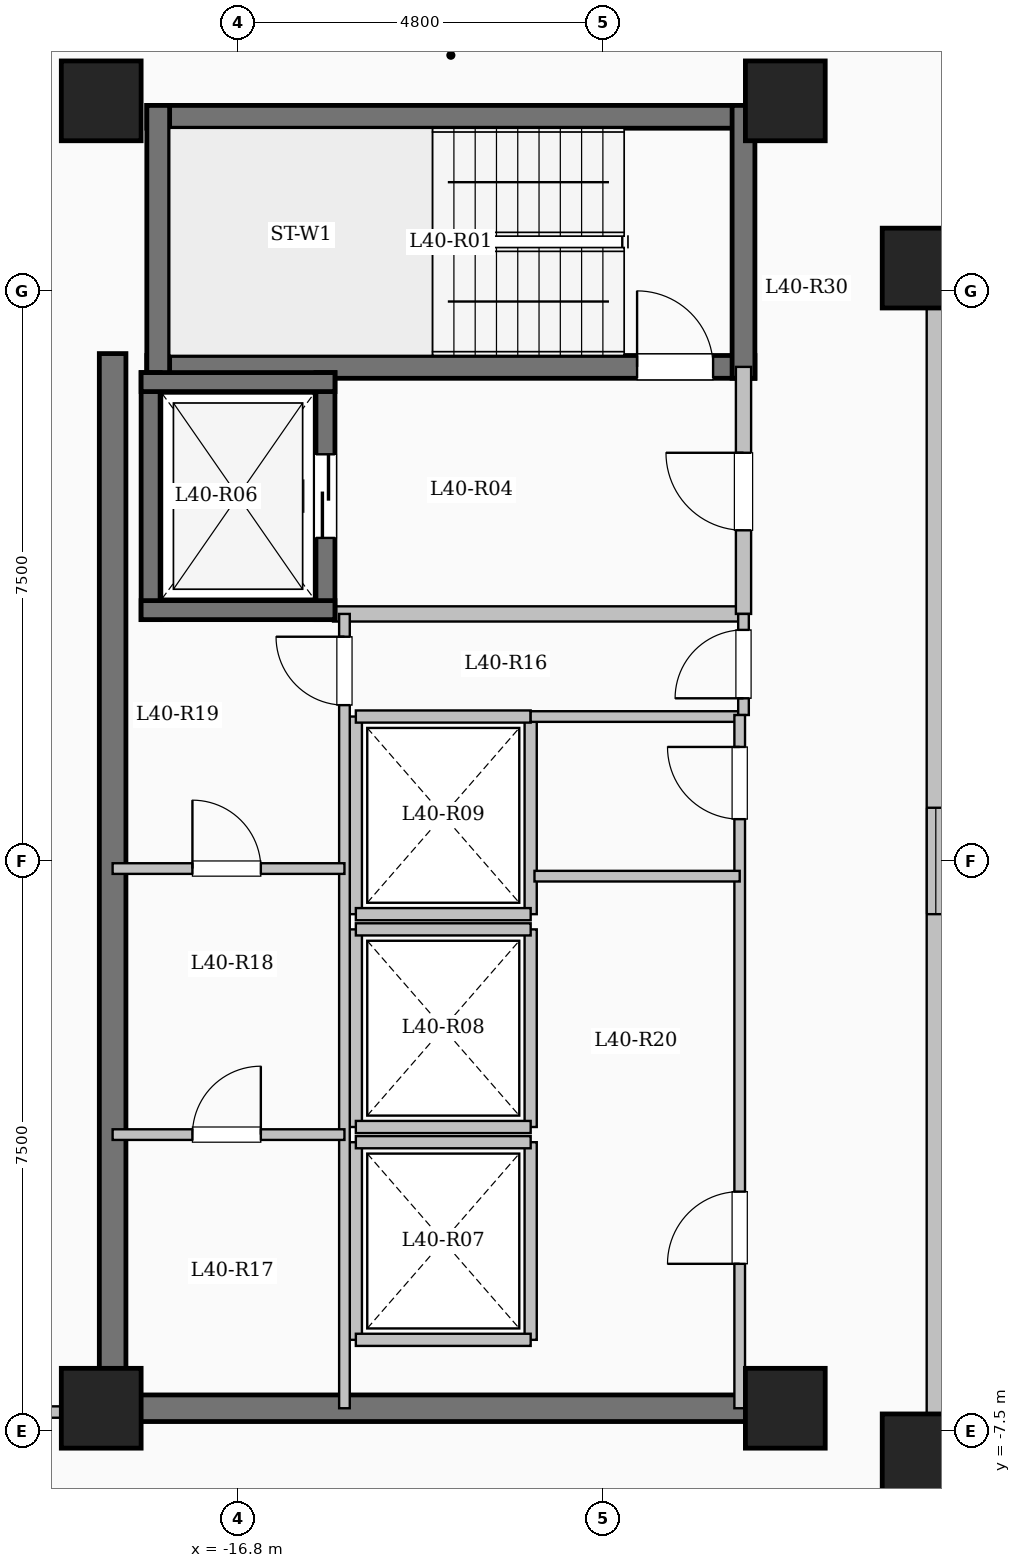
"""IFC4 building model, lengths in metres.
Left out: names, types, materials, properties, quantities, classifications, styles, units other than length and angle.
Written with IfcOpenShell. Run it as: python <this file> out.ifc"""

import sys

from ifc_helpers import new_model, si_unit, direction, frame, frame_2d, origin, origin_2d, place, context, subcontext, project, spatial, rectangle, extrude, element, fill, save


model = new_model("IFC4")
c1 = context("Model", 3, precision=1e-05, world=origin(), true_north=direction((0.0, 1.0)))
c2 = subcontext(c1, "Body", "Model", "MODEL_VIEW")
j1 = project(units=[si_unit("LENGTHUNIT", "METRE"), si_unit("PLANEANGLEUNIT", "RADIAN")], contexts=[c1])
p1 = place(None, origin())
s1 = spatial("IfcSite", under=j1, at=p1, CompositionType="ELEMENT")
p2 = place(p1, origin())
s2 = spatial("IfcBuilding", under=s1, at=p2, CompositionType="ELEMENT")
p3 = place(p2, frame((0.0, 0.0, 149.35)))
s3 = spatial("IfcBuildingStorey", under=s2, at=p3, CompositionType="ELEMENT", Elevation=149.35)
for number, where, z_axis, x_axis in (
    (1, (-7.8, -7.8, 0.0), (0.0, 0.0, 1.0), (1.0, 0.0, 0.0)),
    (2, (-7.8, 7.8, 0.0), (0.0, 0.0, 1.0), (1.0, 0.0, 0.0)),
    (3, (-9.6, -7.2, 0.0), (0.0, 0.0, 1.0), (1.0, 0.0, 0.0)),
    (4, (-9.6, 10.0, 0.0), (0.0, 0.0, 1.0), (1.0, 0.0, 0.0)),
    (5, (-18.6, -7.2, 0.0), (0.0, 0.0, 1.0), (1.0, 0.0, 0.0)),
    (6, (-18.6, 10.0, 0.0), (0.0, 0.0, 1.0), (1.0, 0.0, 0.0)),
):
    element("IfcColumn", number, at=place(p3, frame(where, z_axis=z_axis, x_axis=x_axis)), inside=s3, PredefinedType="COLUMN", context=c2, shape_type="SweptSolid", body=[
        extrude(rectangle(XDim=1.05, YDim=1.05, at=origin_2d()), origin(), (0.0, 0.0, 1.0), 3.35),
    ])
p4 = place(p3, frame((-7.62, -7.62, 0.0), z_axis=(0.0, 0.0, 1.0), x_axis=(1.0, 0.0, 0.0)))
e7 = element("IfcWall", 7, at=p4, inside=s3, PredefinedType="SOLIDWALL", context=c2, shape_type="SweptSolid", body=[
    extrude(rectangle(XDim=15.24, YDim=0.24, at=frame_2d((7.62, 0.0))), origin(), (0.0, 0.0, 1.0), 3.1),
])
p5 = place(p4, frame((6.92, 0.0, 0.95)))
e8 = element("IfcOpeningElement", 8, at=p5, cuts=e7, PredefinedType="OPENING", context=c2, shape_type="SweptSolid", body=[
    extrude(rectangle(XDim=1.4, YDim=1.5, at=frame_2d((0.7, 0.75))), frame((0.0, 0.13, 0.0), z_axis=(0.0, -1.0, 0.0), x_axis=(1.0, 0.0, 0.0)), (0.0, 0.0, 1.0), 0.26),
])
p6 = place(p3, frame((7.62, 7.62, 0.0), z_axis=(0.0, 0.0, 1.0), x_axis=(-1.0, 0.0, 0.0)))
e9 = element("IfcWall", 9, at=p6, inside=s3, PredefinedType="SOLIDWALL", context=c2, shape_type="SweptSolid", body=[
    extrude(rectangle(XDim=15.24, YDim=0.24, at=frame_2d((7.62, 0.0))), origin(), (0.0, 0.0, 1.0), 3.1),
])
p7 = place(p6, frame((6.92, 0.0, 0.95)))
e10 = element("IfcOpeningElement", 10, at=p7, cuts=e9, PredefinedType="OPENING", context=c2, shape_type="SweptSolid", body=[
    extrude(rectangle(XDim=1.4, YDim=1.5, at=frame_2d((0.7, 0.75))), frame((0.0, 0.13, 0.0), z_axis=(0.0, -1.0, 0.0), x_axis=(1.0, 0.0, 0.0)), (0.0, 0.0, 1.0), 0.26),
])
p8 = place(p3, frame((-7.62, 7.62, 0.0), z_axis=(0.0, 0.0, 1.0), x_axis=(0.0, -1.0, 0.0)))
e11 = element("IfcWall", 11, at=p8, inside=s3, PredefinedType="SOLIDWALL", context=c2, shape_type="SweptSolid", body=[
    extrude(rectangle(XDim=15.24, YDim=0.24, at=frame_2d((7.62, 0.0))), origin(), (0.0, 0.0, 1.0), 3.1),
])
p9 = place(p8, frame((6.92, 0.0, 0.95)))
e12 = element("IfcOpeningElement", 12, at=p9, cuts=e11, PredefinedType="OPENING", context=c2, shape_type="SweptSolid", body=[
    extrude(rectangle(XDim=1.4, YDim=1.5, at=frame_2d((0.7, 0.75))), frame((0.0, 0.13, 0.0), z_axis=(0.0, -1.0, 0.0), x_axis=(1.0, 0.0, 0.0)), (0.0, 0.0, 1.0), 0.26),
])
p10 = place(p3, frame((-18.0, 9.79, 0.0), z_axis=(0.0, 0.0, 1.0), x_axis=(1.0, 0.0, 0.0)))
e13 = element("IfcWall", 13, at=p10, inside=s3, PredefinedType="SHEAR", context=c2, shape_type="SweptSolid", body=[
    extrude(rectangle(XDim=8.0, YDim=0.3, at=frame_2d((4.0, 0.0))), origin(), (0.0, 0.0, 1.0), 3.35),
])
p11 = place(p3, frame((-18.0, 6.5, 0.0), z_axis=(0.0, 0.0, 1.0), x_axis=(1.0, 0.0, 0.0)))
e14 = element("IfcWall", 14, at=p11, inside=s3, PredefinedType="SHEAR", context=c2, shape_type="SweptSolid", body=[
    extrude(rectangle(XDim=8.0, YDim=0.3, at=frame_2d((4.0, 0.0))), origin(), (0.0, 0.0, 1.0), 3.35),
])
p12 = place(p11, frame((6.45, 0.0, 0.0)))
e15 = element("IfcOpeningElement", 15, at=p12, cuts=e14, PredefinedType="OPENING", context=c2, shape_type="SweptSolid", body=[
    extrude(rectangle(XDim=1.0, YDim=2.15, at=frame_2d((0.5, 1.075))), frame((0.0, 0.16, 0.0), z_axis=(0.0, -1.0, 0.0), x_axis=(1.0, 0.0, 0.0)), (0.0, 0.0, 1.0), 0.32),
])
for number, where, z_axis, x_axis in (
    (16, (-17.85, 6.35, 0.0), (0.0, 0.0, 1.0), (0.0, 1.0, 0.0)),
    (17, (-10.15, 6.35, 0.0), (0.0, 0.0, 1.0), (0.0, 1.0, 0.0)),
):
    element("IfcWall", number, at=place(p3, frame(where, z_axis=z_axis, x_axis=x_axis)), inside=s3, PredefinedType="SHEAR", context=c2, shape_type="SweptSolid", body=[
        extrude(rectangle(XDim=3.59, YDim=0.3, at=frame_2d((1.795, 0.0))), origin(), (0.0, 0.0, 1.0), 3.35),
    ])
p13 = place(p3, frame((-15.55, 3.25, 0.0), z_axis=(0.0, 0.0, 1.0), x_axis=(1.0, 0.0, 0.0)))
e18 = element("IfcWall", 18, at=p13, inside=s3, PredefinedType="SOLIDWALL", context=c2, shape_type="SweptSolid", body=[
    extrude(rectangle(XDim=5.4, YDim=0.2, at=frame_2d((2.7, 0.0))), origin(), (0.0, 0.0, 1.0), 3.1),
])
p14 = place(p3, frame((-10.15, 3.25, 0.0), z_axis=(0.0, 0.0, 1.0), x_axis=(0.0, 1.0, 0.0)))
e19 = element("IfcWall", 19, at=p14, inside=s3, PredefinedType="SOLIDWALL", context=c2, shape_type="SweptSolid", body=[
    extrude(rectangle(XDim=3.25, YDim=0.2, at=frame_2d((1.625, 0.0))), origin(), (0.0, 0.0, 1.0), 3.1),
])
p15 = place(p14, frame((1.1, 0.0, 0.0)))
e20 = element("IfcOpeningElement", 20, at=p15, cuts=e19, PredefinedType="OPENING", context=c2, shape_type="SweptSolid", body=[
    extrude(rectangle(XDim=1.02, YDim=2.15, at=frame_2d((0.51, 1.075))), frame((0.0, 0.11, 0.0), z_axis=(0.0, -1.0, 0.0), x_axis=(1.0, 0.0, 0.0)), (0.0, 0.0, 1.0), 0.22),
])
p16 = place(p3, frame((-17.95, 3.175, 0.0), z_axis=(0.0, 0.0, 1.0), x_axis=(0.0, 1.0, 0.0)))
e21 = element("IfcWall", 21, at=p16, inside=s3, PredefinedType="SHEAR", context=c2, shape_type="SweptSolid", body=[
    extrude(rectangle(XDim=3.25, YDim=0.25, at=frame_2d((1.625, 0.0))), origin(), (0.0, 0.0, 1.0), 3.35),
])
p17 = place(p3, frame((-15.65, 3.175, 0.0), z_axis=(0.0, 0.0, 1.0), x_axis=(0.0, 1.0, 0.0)))
e22 = element("IfcWall", 22, at=p17, inside=s3, PredefinedType="SHEAR", context=c2, shape_type="SweptSolid", body=[
    extrude(rectangle(XDim=3.25, YDim=0.25, at=frame_2d((1.625, 0.0))), origin(), (0.0, 0.0, 1.0), 3.35),
])
p18 = place(p17, frame((1.075, 0.0, 0.0)))
e23 = element("IfcOpeningElement", 23, at=p18, cuts=e22, PredefinedType="OPENING", context=c2, shape_type="SweptSolid", body=[
    extrude(rectangle(XDim=1.1, YDim=2.15, at=frame_2d((0.55, 1.075))), frame((0.0, 0.135, 0.0), z_axis=(0.0, -1.0, 0.0), x_axis=(1.0, 0.0, 0.0)), (0.0, 0.0, 1.0), 0.27),
])
for number, where, z_axis, x_axis in (
    (24, (-18.075, 3.3, 0.0), (0.0, 0.0, 1.0), (1.0, 0.0, 0.0)),
    (25, (-18.075, 6.3, 0.0), (0.0, 0.0, 1.0), (1.0, 0.0, 0.0)),
):
    element("IfcWall", number, at=place(p3, frame(where, z_axis=z_axis, x_axis=x_axis)), inside=s3, PredefinedType="SHEAR", context=c2, shape_type="SweptSolid", body=[
        extrude(rectangle(XDim=2.55, YDim=0.25, at=frame_2d((1.275, 0.0))), origin(), (0.0, 0.0, 1.0), 3.35),
    ])
for number, where, z_axis, x_axis in (
    (26, (-15.25, -6.3, 0.0), (0.0, 0.0, 1.0), (0.0, 1.0, 0.0)),
    (27, (-12.95, -6.3, 0.0), (0.0, 0.0, 1.0), (0.0, 1.0, 0.0)),
):
    element("IfcWall", number, at=place(p3, frame(where, z_axis=z_axis, x_axis=x_axis)), inside=s3, PredefinedType="SOLIDWALL", context=c2, shape_type="SweptSolid", body=[
        extrude(rectangle(XDim=2.6, YDim=0.16, at=frame_2d((1.3, 0.0))), origin(), (0.0, 0.0, 1.0), 3.1),
    ])
for number, where, z_axis, x_axis in (
    (28, (-15.25, -6.3, 0.0), (0.0, 0.0, 1.0), (1.0, 0.0, 0.0)),
    (29, (-15.25, -3.7, 0.0), (0.0, 0.0, 1.0), (1.0, 0.0, 0.0)),
):
    element("IfcWall", number, at=place(p3, frame(where, z_axis=z_axis, x_axis=x_axis)), inside=s3, PredefinedType="SOLIDWALL", context=c2, shape_type="SweptSolid", body=[
        extrude(rectangle(XDim=2.3, YDim=0.16, at=frame_2d((1.15, 0.0))), origin(), (0.0, 0.0, 1.0), 3.1),
    ])
for number, where, z_axis, x_axis in (
    (30, (-15.25, -3.5, 0.0), (0.0, 0.0, 1.0), (0.0, 1.0, 0.0)),
    (31, (-12.95, -3.5, 0.0), (0.0, 0.0, 1.0), (0.0, 1.0, 0.0)),
):
    element("IfcWall", number, at=place(p3, frame(where, z_axis=z_axis, x_axis=x_axis)), inside=s3, PredefinedType="SOLIDWALL", context=c2, shape_type="SweptSolid", body=[
        extrude(rectangle(XDim=2.6, YDim=0.16, at=frame_2d((1.3, 0.0))), origin(), (0.0, 0.0, 1.0), 3.1),
    ])
for number, where, z_axis, x_axis in (
    (32, (-15.25, -3.5, 0.0), (0.0, 0.0, 1.0), (1.0, 0.0, 0.0)),
    (33, (-15.25, -0.9, 0.0), (0.0, 0.0, 1.0), (1.0, 0.0, 0.0)),
):
    element("IfcWall", number, at=place(p3, frame(where, z_axis=z_axis, x_axis=x_axis)), inside=s3, PredefinedType="SOLIDWALL", context=c2, shape_type="SweptSolid", body=[
        extrude(rectangle(XDim=2.3, YDim=0.16, at=frame_2d((1.15, 0.0))), origin(), (0.0, 0.0, 1.0), 3.1),
    ])
for number, where, z_axis, x_axis in (
    (34, (-15.25, -0.7, 0.0), (0.0, 0.0, 1.0), (0.0, 1.0, 0.0)),
    (35, (-12.95, -0.7, 0.0), (0.0, 0.0, 1.0), (0.0, 1.0, 0.0)),
):
    element("IfcWall", number, at=place(p3, frame(where, z_axis=z_axis, x_axis=x_axis)), inside=s3, PredefinedType="SOLIDWALL", context=c2, shape_type="SweptSolid", body=[
        extrude(rectangle(XDim=2.6, YDim=0.16, at=frame_2d((1.3, 0.0))), origin(), (0.0, 0.0, 1.0), 3.1),
    ])
for number, where, z_axis, x_axis in (
    (36, (-15.25, -0.7, 0.0), (0.0, 0.0, 1.0), (1.0, 0.0, 0.0)),
    (37, (-15.25, 1.9, 0.0), (0.0, 0.0, 1.0), (1.0, 0.0, 0.0)),
):
    element("IfcWall", number, at=place(p3, frame(where, z_axis=z_axis, x_axis=x_axis)), inside=s3, PredefinedType="SOLIDWALL", context=c2, shape_type="SweptSolid", body=[
        extrude(rectangle(XDim=2.3, YDim=0.16, at=frame_2d((1.15, 0.0))), origin(), (0.0, 0.0, 1.0), 3.1),
    ])
p19 = place(p3, frame((-18.45, -7.375, 0.0), z_axis=(0.0, 0.0, 1.0), x_axis=(0.0, 1.0, 0.0)))
e38 = element("IfcWall", 38, at=p19, inside=s3, PredefinedType="SHEAR", context=c2, shape_type="SweptSolid", body=[
    extrude(rectangle(XDim=14.05, YDim=0.35, at=frame_2d((7.025, 0.0))), origin(), (0.0, 0.0, 1.0), 3.35),
])
p20 = place(p3, frame((-18.625, -7.2, 0.0), z_axis=(0.0, 0.0, 1.0), x_axis=(1.0, 0.0, 0.0)))
e39 = element("IfcWall", 39, at=p20, inside=s3, PredefinedType="SHEAR", context=c2, shape_type="SweptSolid", body=[
    extrude(rectangle(XDim=8.55, YDim=0.35, at=frame_2d((4.275, 0.0))), origin(), (0.0, 0.0, 1.0), 3.35),
])
p21 = place(p3, frame((-12.95, 1.9, 0.0), z_axis=(0.0, 0.0, 1.0), x_axis=(1.0, 0.0, 0.0)))
e40 = element("IfcWall", 40, at=p21, inside=s3, PredefinedType="PARTITIONING", context=c2, shape_type="SweptSolid", body=[
    extrude(rectangle(XDim=2.8, YDim=0.14, at=frame_2d((1.4, 0.0))), origin(), (0.0, 0.0, 1.0), 3.1),
])
p22 = place(p3, frame((-10.15, 1.92, 0.0), z_axis=(0.0, 0.0, 1.0), x_axis=(0.0, 1.0, 0.0)))
e41 = element("IfcWall", 41, at=p22, inside=s3, PredefinedType="PARTITIONING", context=c2, shape_type="SweptSolid", body=[
    extrude(rectangle(XDim=1.33, YDim=0.14, at=frame_2d((0.665, 0.0))), origin(), (0.0, 0.0, 1.0), 3.1),
])
p23 = place(p22, frame((0.22, 0.0, 0.0)))
e42 = element("IfcOpeningElement", 42, at=p23, cuts=e41, PredefinedType="OPENING", context=c2, shape_type="SweptSolid", body=[
    extrude(rectangle(XDim=0.9, YDim=2.08, at=frame_2d((0.45, 1.04))), frame((0.0, 0.08, 0.0), z_axis=(0.0, -1.0, 0.0), x_axis=(1.0, 0.0, 0.0)), (0.0, 0.0, 1.0), 0.16),
])
p24 = place(p3, frame((-15.4, -7.2, 0.0), z_axis=(0.0, 0.0, 1.0), x_axis=(0.0, 1.0, 0.0)))
e43 = element("IfcWall", 43, at=p24, inside=s3, PredefinedType="PARTITIONING", context=c2, shape_type="SweptSolid", body=[
    extrude(rectangle(XDim=10.45, YDim=0.14, at=frame_2d((5.225, 0.0))), origin(), (0.0, 0.0, 1.0), 3.1),
])
p25 = place(p24, frame((9.25, 0.0, 0.0)))
e44 = element("IfcOpeningElement", 44, at=p25, cuts=e43, PredefinedType="OPENING", context=c2, shape_type="SweptSolid", body=[
    extrude(rectangle(XDim=0.9, YDim=2.08, at=frame_2d((0.45, 1.04))), frame((0.0, 0.08, 0.0), z_axis=(0.0, -1.0, 0.0), x_axis=(1.0, 0.0, 0.0)), (0.0, 0.0, 1.0), 0.16),
])
p26 = place(p3, frame((-18.45, -3.6, 0.0), z_axis=(0.0, 0.0, 1.0), x_axis=(1.0, 0.0, 0.0)))
e45 = element("IfcWall", 45, at=p26, inside=s3, PredefinedType="PARTITIONING", context=c2, shape_type="SweptSolid", body=[
    extrude(rectangle(XDim=3.05, YDim=0.14, at=frame_2d((1.525, 0.0))), origin(), (0.0, 0.0, 1.0), 3.1),
])
p27 = place(p26, frame((1.05, 0.0, 0.0)))
e46 = element("IfcOpeningElement", 46, at=p27, cuts=e45, PredefinedType="OPENING", context=c2, shape_type="SweptSolid", body=[
    extrude(rectangle(XDim=0.9, YDim=2.08, at=frame_2d((0.45, 1.04))), frame((0.0, 0.08, 0.0), z_axis=(0.0, -1.0, 0.0), x_axis=(1.0, 0.0, 0.0)), (0.0, 0.0, 1.0), 0.16),
])
p28 = place(p3, frame((-18.45, -0.1, 0.0), z_axis=(0.0, 0.0, 1.0), x_axis=(1.0, 0.0, 0.0)))
e47 = element("IfcWall", 47, at=p28, inside=s3, PredefinedType="PARTITIONING", context=c2, shape_type="SweptSolid", body=[
    extrude(rectangle(XDim=3.05, YDim=0.14, at=frame_2d((1.525, 0.0))), origin(), (0.0, 0.0, 1.0), 3.1),
])
p29 = place(p28, frame((1.05, 0.0, 0.0)))
e48 = element("IfcOpeningElement", 48, at=p29, cuts=e47, PredefinedType="OPENING", context=c2, shape_type="SweptSolid", body=[
    extrude(rectangle(XDim=0.9, YDim=2.08, at=frame_2d((0.45, 1.04))), frame((0.0, 0.08, 0.0), z_axis=(0.0, -1.0, 0.0), x_axis=(1.0, 0.0, 0.0)), (0.0, 0.0, 1.0), 0.16),
])
p30 = place(p3, frame((-10.2, -7.2, 0.0), z_axis=(0.0, 0.0, 1.0), x_axis=(0.0, 1.0, 0.0)))
e49 = element("IfcWall", 49, at=p30, inside=s3, PredefinedType="PARTITIONING", context=c2, shape_type="SweptSolid", body=[
    extrude(rectangle(XDim=9.12, YDim=0.14, at=frame_2d((4.56, 0.0))), origin(), (0.0, 0.0, 1.0), 3.1),
])
p31 = place(p30, frame((1.9, 0.0, 0.0)))
e50 = element("IfcOpeningElement", 50, at=p31, cuts=e49, PredefinedType="OPENING", context=c2, shape_type="SweptSolid", body=[
    extrude(rectangle(XDim=0.95, YDim=2.12, at=frame_2d((0.475, 1.06))), frame((0.0, 0.08, 0.0), z_axis=(0.0, -1.0, 0.0), x_axis=(1.0, 0.0, 0.0)), (0.0, 0.0, 1.0), 0.16),
])
p32 = place(p30, frame((7.75, 0.0, 0.0)))
e51 = element("IfcOpeningElement", 51, at=p32, cuts=e49, PredefinedType="OPENING", context=c2, shape_type="SweptSolid", body=[
    extrude(rectangle(XDim=0.95, YDim=2.12, at=frame_2d((0.475, 1.06))), frame((0.0, 0.08, 0.0), z_axis=(0.0, -1.0, 0.0), x_axis=(1.0, 0.0, 0.0)), (0.0, 0.0, 1.0), 0.16),
])
p33 = place(p3, frame((-12.9, -0.2, 0.0), z_axis=(0.0, 0.0, 1.0), x_axis=(1.0, 0.0, 0.0)))
e52 = element("IfcWall", 52, at=p33, inside=s3, PredefinedType="PARTITIONING", context=c2, shape_type="SweptSolid", body=[
    extrude(rectangle(XDim=2.7, YDim=0.14, at=frame_2d((1.35, 0.0))), origin(), (0.0, 0.0, 1.0), 3.1),
])
p34 = place(p3, frame((-25.08, -7.25, 0.0), z_axis=(0.0, 0.0, 1.0), x_axis=(1.0, 0.0, 0.0)))
e53 = element("IfcWall", 53, at=p34, inside=s3, PredefinedType="PARTITIONING", context=c2, shape_type="SweptSolid", body=[
    extrude(rectangle(XDim=6.63, YDim=0.15, at=frame_2d((3.315, 0.0))), origin(), (0.0, 0.0, 1.0), 3.1),
])
p35 = place(p34, frame((3.58, 0.0, 0.0)))
e54 = element("IfcOpeningElement", 54, at=p35, cuts=e53, PredefinedType="OPENING", context=c2, shape_type="SweptSolid", body=[
    extrude(rectangle(XDim=1.08, YDim=2.15, at=frame_2d((0.54, 1.075))), frame((0.0, 0.085, 0.0), z_axis=(0.0, -1.0, 0.0), x_axis=(1.0, 0.0, 0.0)), (0.0, 0.0, 1.0), 0.17),
])
p36 = place(p9, origin())
e55 = element("IfcWindow", 55, at=p36, inside=s3, PartitioningType="SINGLE_PANEL", PredefinedType="WINDOW", context=c2, shape_type="SweptSolid", body=[
    extrude(rectangle(XDim=1.4, YDim=1.5, at=frame_2d((0.7, 0.75))), frame((0.0, 0.03, 0.0), z_axis=(0.0, -1.0, 0.0), x_axis=(1.0, 0.0, 0.0)), (0.0, 0.0, 1.0), 0.06),
])
fill(e12, e55)
p37 = place(p12, origin())
e56 = element("IfcDoor", 56, at=p37, inside=s3, OperationType="SINGLE_SWING_LEFT", PredefinedType="DOOR", context=c2, shape_type="SweptSolid", body=[
    extrude(rectangle(XDim=1.0, YDim=2.15, at=frame_2d((0.5, 1.075))), frame((0.0, 0.025, 0.0), z_axis=(0.0, -1.0, 0.0), x_axis=(1.0, 0.0, 0.0)), (0.0, 0.0, 1.0), 0.05),
])
fill(e15, e56)
p38 = place(p15, origin())
e57 = element("IfcDoor", 57, at=p38, inside=s3, OperationType="SINGLE_SWING_RIGHT", PredefinedType="DOOR", context=c2, shape_type="SweptSolid", body=[
    extrude(rectangle(XDim=1.02, YDim=2.15, at=frame_2d((0.51, 1.075))), frame((0.0, 0.025, 0.0), z_axis=(0.0, -1.0, 0.0), x_axis=(1.0, 0.0, 0.0)), (0.0, 0.0, 1.0), 0.05),
])
fill(e20, e57)
p39 = place(p18, origin())
e58 = element("IfcDoor", 58, at=p39, inside=s3, OperationType="SLIDING_TO_LEFT", PredefinedType="DOOR", context=c2, shape_type="SweptSolid", body=[
    extrude(rectangle(XDim=1.1, YDim=2.15, at=frame_2d((0.55, 1.075))), frame((0.0, 0.025, 0.0), z_axis=(0.0, -1.0, 0.0), x_axis=(1.0, 0.0, 0.0)), (0.0, 0.0, 1.0), 0.05),
])
fill(e23, e58)
p40 = place(p23, origin())
e59 = element("IfcDoor", 59, at=p40, inside=s3, OperationType="SINGLE_SWING_LEFT", PredefinedType="DOOR", context=c2, shape_type="SweptSolid", body=[
    extrude(rectangle(XDim=0.9, YDim=2.08, at=frame_2d((0.45, 1.04))), frame((0.0, 0.025, 0.0), z_axis=(0.0, -1.0, 0.0), x_axis=(1.0, 0.0, 0.0)), (0.0, 0.0, 1.0), 0.05),
])
fill(e42, e59)
p41 = place(p25, origin())
e60 = element("IfcDoor", 60, at=p41, inside=s3, OperationType="SINGLE_SWING_RIGHT", PredefinedType="DOOR", context=c2, shape_type="SweptSolid", body=[
    extrude(rectangle(XDim=0.9, YDim=2.08, at=frame_2d((0.45, 1.04))), frame((0.0, 0.025, 0.0), z_axis=(0.0, -1.0, 0.0), x_axis=(1.0, 0.0, 0.0)), (0.0, 0.0, 1.0), 0.05),
])
fill(e44, e60)
p42 = place(p29, origin())
e61 = element("IfcDoor", 61, at=p42, inside=s3, OperationType="SINGLE_SWING_LEFT", PredefinedType="DOOR", context=c2, shape_type="SweptSolid", body=[
    extrude(rectangle(XDim=0.9, YDim=2.08, at=frame_2d((0.45, 1.04))), frame((0.0, 0.025, 0.0), z_axis=(0.0, -1.0, 0.0), x_axis=(1.0, 0.0, 0.0)), (0.0, 0.0, 1.0), 0.05),
])
fill(e48, e61)
p43 = place(p27, origin())
e62 = element("IfcDoor", 62, at=p43, inside=s3, OperationType="SINGLE_SWING_RIGHT", PredefinedType="DOOR", context=c2, shape_type="SweptSolid", body=[
    extrude(rectangle(XDim=0.9, YDim=2.08, at=frame_2d((0.45, 1.04))), frame((0.0, 0.025, 0.0), z_axis=(0.0, -1.0, 0.0), x_axis=(1.0, 0.0, 0.0)), (0.0, 0.0, 1.0), 0.05),
])
fill(e46, e62)
p44 = place(p31, origin())
e63 = element("IfcDoor", 63, at=p44, inside=s3, OperationType="SINGLE_SWING_LEFT", PredefinedType="DOOR", context=c2, shape_type="SweptSolid", body=[
    extrude(rectangle(XDim=0.95, YDim=2.12, at=frame_2d((0.475, 1.06))), frame((0.0, 0.025, 0.0), z_axis=(0.0, -1.0, 0.0), x_axis=(1.0, 0.0, 0.0)), (0.0, 0.0, 1.0), 0.05),
])
fill(e50, e63)
p45 = place(p32, origin())
e64 = element("IfcDoor", 64, at=p45, inside=s3, OperationType="SINGLE_SWING_RIGHT", PredefinedType="DOOR", context=c2, shape_type="SweptSolid", body=[
    extrude(rectangle(XDim=0.95, YDim=2.12, at=frame_2d((0.475, 1.06))), frame((0.0, 0.025, 0.0), z_axis=(0.0, -1.0, 0.0), x_axis=(1.0, 0.0, 0.0)), (0.0, 0.0, 1.0), 0.05),
])
fill(e51, e64)
save(model, sys.argv[1])
